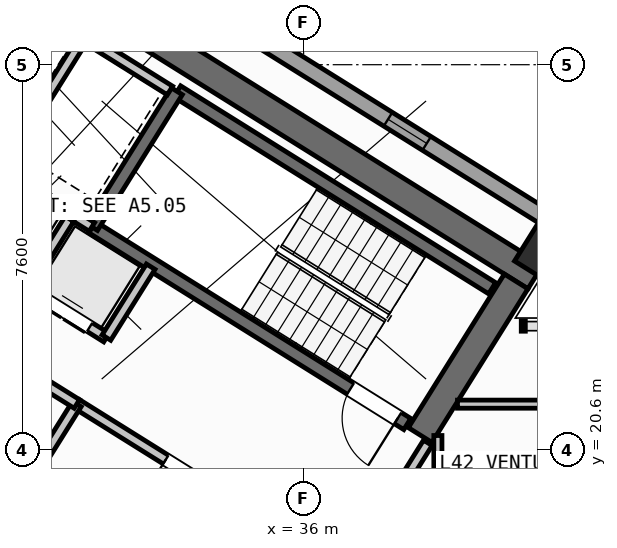
"""IFC4 building model, lengths in metres.
Left out: names, types, materials, properties, quantities, classifications, styles, units other than length and angle.
Written with IfcOpenShell. Run it as: python <this file> out.ifc"""

import sys

from ifc_helpers import new_model, si_unit, direction, frame, frame_2d, origin, origin_2d, place, context, subcontext, project, spatial, rectangle, hollow_rectangle, extrude, source, transform, mapped, element, fill, save


model = new_model("IFC4")
c1 = context("Model", 3, precision=1e-05, world=origin(), true_north=direction((0.0, 1.0)))
c2 = subcontext(c1, "Body", "Model", "MODEL_VIEW")
j1 = project(units=[si_unit("LENGTHUNIT", "METRE"), si_unit("PLANEANGLEUNIT", "RADIAN")], contexts=[c1])
p1 = place(None, origin())
s1 = spatial("IfcSite", under=j1, at=p1, CompositionType="ELEMENT")
p2 = place(p1, origin())
s2 = spatial("IfcBuilding", under=s1, at=p2, CompositionType="ELEMENT")
p3 = place(p2, frame((0.0, 0.0, 165.9)))
s3 = spatial("IfcBuildingStorey", under=s2, at=p3, CompositionType="ELEMENT", Elevation=165.9)
p4 = place(p3, frame((40.573, 24.01, 0.0), z_axis=(0.0, 0.0, 1.0), x_axis=(-0.848047359947, 0.529920442413, 0.0)))
e1 = element("IfcWall", 1, at=p4, inside=s3, PredefinedType="SHEAR", context=c2, shape_type="SweptSolid", body=[
    extrude(rectangle(XDim=13.14, YDim=0.55, at=frame_2d((6.57, 0.0))), origin(), (0.0, 0.0, 1.0), 3.32),
])
p5 = place(p3, frame((40.194, 23.922, 0.0), z_axis=(0.0, 0.0, 1.0), x_axis=(-0.529888438328, -0.848067357541, 0.0)))
e2 = element("IfcWall", 2, at=p5, inside=s3, PredefinedType="SHEAR", context=c2, shape_type="SweptSolid", body=[
    extrude(rectangle(XDim=3.575, YDim=0.55, at=frame_2d((1.788, 0.0))), origin(), (0.0, 0.0, 1.0), 3.32),
])
m1 = source(origin(), c2, "Body", "SweptSolid", [
    extrude(hollow_rectangle(XDim=0.9, YDim=0.9, WallThickness=0.036, at=origin_2d()), origin(), (0.0, 0.0, 1.0), 3.6),
])
p6 = place(p3, frame((40.783, 24.469, 0.0), z_axis=(0.0, 0.0, 1.0), x_axis=(-0.848048096156, 0.529919264233, 0.0)))
e3 = element("IfcColumn", 3, at=p6, inside=s3, PredefinedType="COLUMN", context=c2, shape_type="MappedRepresentation", body=[
    mapped(m1, transform((0.0, 0.0, 0.0), scale=1.0)),
])
p7 = place(p3, frame((14.138, 41.825, 0.0), z_axis=(0.0, 0.0, 1.0), x_axis=(0.848046498049, -0.529921821731, 0.0)))
e4 = element("IfcWall", 4, at=p7, inside=s3, PredefinedType="STANDARD", context=c2, shape_type="SweptSolid", body=[
    extrude(rectangle(XDim=31.588, YDim=0.32, at=frame_2d((15.794, 0.0))), origin(), (0.0, 0.0, 1.0), 3.32),
])
p8 = place(p7, frame((3.253, 0.0, 0.0)))
e5 = element("IfcOpeningElement", 5, at=p8, cuts=e4, PredefinedType="OPENING", context=c2, shape_type="SweptSolid", body=[
    extrude(rectangle(XDim=1.05, YDim=2.15, at=frame_2d((0.525, 1.075))), frame((0.0, 0.17, 0.0), z_axis=(0.0, -1.0, 0.0), x_axis=(1.0, 0.0, 0.0)), (0.0, 0.0, 1.0), 0.34),
])
p9 = place(p7, frame((0.863, 0.0, 0.85)))
e6 = element("IfcOpeningElement", 6, at=p9, cuts=e4, PredefinedType="OPENING", context=c2, shape_type="SweptSolid", body=[
    extrude(rectangle(XDim=1.8, YDim=1.5, at=frame_2d((0.9, 0.75))), frame((0.0, 0.17, 0.0), z_axis=(0.0, -1.0, 0.0), x_axis=(1.0, 0.0, 0.0)), (0.0, 0.0, 1.0), 0.34),
])
p10 = place(p7, frame((8.494, 0.0, 0.85)))
e7 = element("IfcOpeningElement", 7, at=p10, cuts=e4, PredefinedType="OPENING", context=c2, shape_type="SweptSolid", body=[
    extrude(rectangle(XDim=1.8, YDim=1.5, at=frame_2d((0.9, 0.75))), frame((0.0, 0.17, 0.0), z_axis=(0.0, -1.0, 0.0), x_axis=(1.0, 0.0, 0.0)), (0.0, 0.0, 1.0), 0.34),
])
p11 = place(p7, frame((13.874, 0.0, 0.85)))
e8 = element("IfcOpeningElement", 8, at=p11, cuts=e4, PredefinedType="OPENING", context=c2, shape_type="SweptSolid", body=[
    extrude(rectangle(XDim=1.5, YDim=1.5, at=frame_2d((0.75, 0.75))), frame((0.0, 0.17, 0.0), z_axis=(0.0, -1.0, 0.0), x_axis=(1.0, 0.0, 0.0)), (0.0, 0.0, 1.0), 0.34),
])
p12 = place(p7, frame((17.104, 0.0, 1.0)))
e9 = element("IfcOpeningElement", 9, at=p12, cuts=e4, PredefinedType="OPENING", context=c2, shape_type="SweptSolid", body=[
    extrude(rectangle(XDim=0.9, YDim=1.25, at=frame_2d((0.45, 0.625))), frame((0.0, 0.17, 0.0), z_axis=(0.0, -1.0, 0.0), x_axis=(1.0, 0.0, 0.0)), (0.0, 0.0, 1.0), 0.34),
])
p13 = place(p7, frame((22.144, 0.0, 1.0)))
e10 = element("IfcOpeningElement", 10, at=p13, cuts=e4, PredefinedType="OPENING", context=c2, shape_type="SweptSolid", body=[
    extrude(rectangle(XDim=0.9, YDim=1.25, at=frame_2d((0.45, 0.625))), frame((0.0, 0.17, 0.0), z_axis=(0.0, -1.0, 0.0), x_axis=(1.0, 0.0, 0.0)), (0.0, 0.0, 1.0), 0.34),
])
p14 = place(p7, frame((27.744, 0.0, 1.0)))
e11 = element("IfcOpeningElement", 11, at=p14, cuts=e4, PredefinedType="OPENING", context=c2, shape_type="SweptSolid", body=[
    extrude(rectangle(XDim=0.9, YDim=1.25, at=frame_2d((0.45, 0.625))), frame((0.0, 0.17, 0.0), z_axis=(0.0, -1.0, 0.0), x_axis=(1.0, 0.0, 0.0)), (0.0, 0.0, 1.0), 0.34),
])
p15 = place(p3, frame((31.28, 18.261, 0.0), z_axis=(0.0, 0.0, 1.0), x_axis=(-0.848051618787, 0.529913626805, 0.0)))
e12 = element("IfcWall", 12, at=p15, inside=s3, PredefinedType="SHEAR", context=c2, shape_type="SweptSolid", body=[
    extrude(rectangle(XDim=7.46, YDim=0.26, at=frame_2d((3.73, 0.0))), origin(), (0.0, 0.0, 1.0), 3.32),
])
p16 = place(p15, frame((0.36, 0.0, 0.0)))
e13 = element("IfcOpeningElement", 13, at=p16, cuts=e12, PredefinedType="OPENING", context=c2, shape_type="SweptSolid", body=[
    extrude(rectangle(XDim=0.86, YDim=2.05, at=frame_2d((0.43, 1.025))), frame((0.0, 0.14, 0.0), z_axis=(0.0, -1.0, 0.0), x_axis=(1.0, 0.0, 0.0)), (0.0, 0.0, 1.0), 0.28),
])
p17 = place(p3, frame((39.721, 23.788, 0.0), z_axis=(0.0, 0.0, 1.0), x_axis=(-0.848054434086, 0.529909121291, 0.0)))
e14 = element("IfcWall", 14, at=p17, inside=s3, PredefinedType="SHEAR", context=c2, shape_type="SweptSolid", body=[
    extrude(rectangle(XDim=7.33, YDim=0.26, at=frame_2d((3.665, 0.0))), origin(), (0.0, 0.0, 1.0), 3.32),
])
p18 = place(p3, frame((38.046, 21.108, 0.0), z_axis=(0.0, 0.0, 1.0), x_axis=(-0.848054434086, 0.529909121291, 0.0)))
e15 = element("IfcWall", 15, at=p18, inside=s3, PredefinedType="SHEAR", context=c2, shape_type="SweptSolid", body=[
    extrude(rectangle(XDim=7.33, YDim=0.26, at=frame_2d((3.665, 0.0))), origin(), (0.0, 0.0, 1.0), 3.32),
])
p19 = place(p18, frame((0.22, 0.0, 0.0)))
e16 = element("IfcOpeningElement", 16, at=p19, cuts=e15, PredefinedType="OPENING", context=c2, shape_type="SweptSolid", body=[
    extrude(rectangle(XDim=1.1, YDim=2.1, at=frame_2d((0.55, 1.05))), frame((0.0, 0.14, 0.0), z_axis=(0.0, -1.0, 0.0), x_axis=(1.0, 0.0, 0.0)), (0.0, 0.0, 1.0), 0.28),
])
p20 = place(p3, frame((33.496, 27.677, 0.0), z_axis=(0.0, 0.0, 1.0), x_axis=(-0.529908658664, -0.84805472316, 0.0)))
e17 = element("IfcWall", 17, at=p20, inside=s3, PredefinedType="SHEAR", context=c2, shape_type="SweptSolid", body=[
    extrude(rectangle(XDim=3.16, YDim=0.26, at=frame_2d((1.58, 0.0))), origin(), (0.0, 0.0, 1.0), 3.32),
])
p21 = place(p3, frame((36.417, 18.447, 0.0), z_axis=(0.0, 0.0, 1.0), x_axis=(-0.848064879198, 0.529892404805, 0.0)))
e18 = element("IfcWall", 18, at=p21, inside=s3, PredefinedType="STANDARD", context=c2, shape_type="SweptSolid", body=[
    extrude(rectangle(XDim=5.768, YDim=0.2, at=frame_2d((2.884, 0.0))), origin(), (0.0, 0.0, 1.0), 3.31),
])
p22 = place(p21, frame((2.548, 0.0, 0.0)))
e19 = element("IfcOpeningElement", 19, at=p22, cuts=e18, PredefinedType="OPENING", context=c2, shape_type="SweptSolid", body=[
    extrude(rectangle(XDim=1.15, YDim=2.1, at=frame_2d((0.575, 1.05))), frame((0.0, 0.11, 0.0), z_axis=(0.0, -1.0, 0.0), x_axis=(1.0, 0.0, 0.0)), (0.0, 0.0, 1.0), 0.22),
])
p23 = place(p3, frame((31.822, 24.998, 0.0), z_axis=(0.0, 0.0, 1.0), x_axis=(-0.848036912365, 0.52993716162, 0.0)))
e20 = element("IfcWall", 20, at=p23, inside=s3, PredefinedType="STANDARD", context=c2, shape_type="SweptSolid", body=[
    extrude(rectangle(XDim=4.618, YDim=0.2, at=frame_2d((2.309, 0.0))), origin(), (0.0, 0.0, 1.0), 3.31),
])
p24 = place(p3, frame((32.108, 22.814, 0.0), z_axis=(0.0, 0.0, 1.0), x_axis=(-0.848042229521, 0.529928652696, 0.0)))
e21 = element("IfcWall", 21, at=p24, inside=s3, PredefinedType="STANDARD", context=c2, shape_type="SweptSolid", body=[
    extrude(rectangle(XDim=5.62, YDim=0.2, at=frame_2d((2.81, 0.0))), origin(), (0.0, 0.0, 1.0), 3.31),
])
p25 = place(p24, frame((0.39, 0.0, 0.0)))
e22 = element("IfcOpeningElement", 22, at=p25, cuts=e21, PredefinedType="OPENING", context=c2, shape_type="SweptSolid", body=[
    extrude(rectangle(XDim=1.1, YDim=2.15, at=frame_2d((0.55, 1.075))), frame((0.0, 0.11, 0.0), z_axis=(0.0, -1.0, 0.0), x_axis=(1.0, 0.0, 0.0)), (0.0, 0.0, 1.0), 0.22),
])
p26 = place(p24, frame((2.25, 0.0, 0.0)))
e23 = element("IfcOpeningElement", 23, at=p26, cuts=e21, PredefinedType="OPENING", context=c2, shape_type="SweptSolid", body=[
    extrude(rectangle(XDim=1.1, YDim=2.15, at=frame_2d((0.55, 1.075))), frame((0.0, 0.11, 0.0), z_axis=(0.0, -1.0, 0.0), x_axis=(1.0, 0.0, 0.0)), (0.0, 0.0, 1.0), 0.22),
])
p27 = place(p24, frame((4.11, 0.0, 0.0)))
e24 = element("IfcOpeningElement", 24, at=p27, cuts=e21, PredefinedType="OPENING", context=c2, shape_type="SweptSolid", body=[
    extrude(rectangle(XDim=1.1, YDim=2.15, at=frame_2d((0.55, 1.075))), frame((0.0, 0.11, 0.0), z_axis=(0.0, -1.0, 0.0), x_axis=(1.0, 0.0, 0.0)), (0.0, 0.0, 1.0), 0.22),
])
p28 = place(p3, frame((32.982, 24.213, 0.0), z_axis=(0.0, 0.0, 1.0), x_axis=(-0.529839334948, -0.84809803628, 0.0)))
e25 = element("IfcWall", 25, at=p28, inside=s3, PredefinedType="STANDARD", context=c2, shape_type="SweptSolid", body=[
    extrude(rectangle(XDim=1.65, YDim=0.2, at=frame_2d((0.825, 0.0))), origin(), (0.0, 0.0, 1.0), 3.31),
])
p29 = place(p3, frame((31.645, 28.716, 0.0), z_axis=(0.0, 0.0, 1.0), x_axis=(-0.52986693015, -0.848080795876, 0.0)))
e26 = element("IfcWall", 26, at=p29, inside=s3, PredefinedType="STANDARD", context=c2, shape_type="SweptSolid", body=[
    extrude(rectangle(XDim=2.66, YDim=0.2, at=frame_2d((1.33, 0.0))), origin(), (0.0, 0.0, 1.0), 3.31),
])
p30 = place(p3, frame((33.363, 27.69, 0.0), z_axis=(0.0, 0.0, 1.0), x_axis=(-0.848047090064, 0.529920874315, 0.0)))
e27 = element("IfcWall", 27, at=p30, inside=s3, PredefinedType="STANDARD", context=c2, shape_type="SweptSolid", body=[
    extrude(rectangle(XDim=4.498, YDim=0.2, at=frame_2d((2.249, 0.0))), origin(), (0.0, 0.0, 1.0), 3.31),
])
p31 = place(p3, frame((31.379, 25.156, 0.0), z_axis=(0.0, 0.0, 1.0), x_axis=(-0.529998940003, -0.847998304005, 0.0)))
e28 = element("IfcWall", 28, at=p31, inside=s3, PredefinedType="STANDARD", context=c2, shape_type="SweptSolid", body=[
    extrude(rectangle(XDim=1.58, YDim=0.2, at=frame_2d((0.79, 0.0))), origin(), (0.0, 0.0, 1.0), 3.31),
])
p32 = place(p3, frame((31.525, 21.504, 0.0), z_axis=(0.0, 0.0, 1.0), x_axis=(-0.529907497854, -0.848055448493, 0.0)))
e29 = element("IfcWall", 29, at=p32, inside=s3, PredefinedType="STANDARD", context=c2, shape_type="SweptSolid", body=[
    extrude(rectangle(XDim=2.88, YDim=0.2, at=frame_2d((1.44, 0.0))), origin(), (0.0, 0.0, 1.0), 3.31),
])
p33 = place(p3, frame((31.525, 21.504, 0.0), z_axis=(0.0, 0.0, 1.0), x_axis=(-0.848040211232, 0.529931882541, 0.0)))
e30 = element("IfcWall", 30, at=p33, inside=s3, PredefinedType="STANDARD", context=c2, shape_type="SweptSolid", body=[
    extrude(rectangle(XDim=6.218, YDim=0.2, at=frame_2d((3.109, 0.0))), origin(), (0.0, 0.0, 1.0), 3.31),
])
p34 = place(p33, frame((4.4, 0.0, 0.0)))
e31 = element("IfcOpeningElement", 31, at=p34, cuts=e30, PredefinedType="OPENING", context=c2, shape_type="SweptSolid", body=[
    extrude(rectangle(XDim=0.86, YDim=2.05, at=frame_2d((0.43, 1.025))), frame((0.0, 0.11, 0.0), z_axis=(0.0, -1.0, 0.0), x_axis=(1.0, 0.0, 0.0)), (0.0, 0.0, 1.0), 0.22),
])
p35 = place(p33, frame((1.45, 0.0, 0.0)))
e32 = element("IfcOpeningElement", 32, at=p35, cuts=e30, PredefinedType="OPENING", context=c2, shape_type="SweptSolid", body=[
    extrude(rectangle(XDim=0.86, YDim=2.05, at=frame_2d((0.43, 1.025))), frame((0.0, 0.11, 0.0), z_axis=(0.0, -1.0, 0.0), x_axis=(1.0, 0.0, 0.0)), (0.0, 0.0, 1.0), 0.22),
])
p36 = place(p3, frame((38.451, 20.737, 0.0), z_axis=(0.0, 0.0, 1.0), x_axis=(-0.529924799939, -0.848044637038, 0.0)))
e33 = element("IfcWall", 33, at=p36, inside=s3, PredefinedType="STANDARD", context=c2, shape_type="SweptSolid", body=[
    extrude(rectangle(XDim=2.96, YDim=0.2, at=frame_2d((1.48, 0.0))), origin(), (0.0, 0.0, 1.0), 3.31),
])
p37 = place(p36, frame((1.46, 0.0, 0.0)))
e34 = element("IfcOpeningElement", 34, at=p37, cuts=e33, PredefinedType="OPENING", context=c2, shape_type="SweptSolid", body=[
    extrude(rectangle(XDim=0.86, YDim=2.05, at=frame_2d((0.43, 1.025))), frame((0.0, 0.11, 0.0), z_axis=(0.0, -1.0, 0.0), x_axis=(1.0, 0.0, 0.0)), (0.0, 0.0, 1.0), 0.22),
])
p38 = place(p3, frame((38.65, 17.93, 0.0), z_axis=(0.0, 0.0, 1.0), x_axis=(0.0, 1.0, 0.0)))
e35 = element("IfcWall", 35, at=p38, inside=s3, PredefinedType="PARTITIONING", context=c2, shape_type="SweptSolid", body=[
    extrude(rectangle(XDim=2.951, YDim=0.16, at=frame_2d((1.476, 0.0))), origin(), (0.0, 0.0, 1.0), 3.31),
])
p39 = place(p3, frame((39.037, 21.5, 0.0), z_axis=(0.0, 0.0, 1.0), x_axis=(1.0, 0.0, 0.0)))
e36 = element("IfcWall", 36, at=p39, inside=s3, PredefinedType="PARTITIONING", context=c2, shape_type="SweptSolid", body=[
    extrude(rectangle(XDim=7.215, YDim=0.16, at=frame_2d((3.607, 0.0))), origin(), (0.0, 0.0, 1.0), 3.31),
])
m2 = source(origin(), c2, "Body", "SweptSolid", [
    extrude(rectangle(XDim=0.9, YDim=1.25, at=frame_2d((0.45, 0.625))), frame((0.0, 0.03, 0.0), z_axis=(0.0, -1.0, 0.0), x_axis=(1.0, 0.0, 0.0)), (0.0, 0.0, 1.0), 0.06),
])
p40 = place(p14, origin())
e37 = element("IfcWindow", 37, at=p40, inside=s3, PartitioningType="SINGLE_PANEL", PredefinedType="WINDOW", context=c2, shape_type="MappedRepresentation", body=[
    mapped(m2, transform((0.0, 0.0, 0.0), scale=1.0)),
])
fill(e11, e37)
m3 = source(origin(), c2, "Body", "SweptSolid", [
    extrude(rectangle(XDim=1.1, YDim=2.1, at=frame_2d((0.55, 1.05))), frame((0.0, 0.025, 0.0), z_axis=(0.0, -1.0, 0.0), x_axis=(1.0, 0.0, 0.0)), (0.0, 0.0, 1.0), 0.05),
])
p41 = place(p19, origin())
e38 = element("IfcDoor", 38, at=p41, inside=s3, OperationType="SINGLE_SWING_LEFT", PredefinedType="DOOR", context=c2, shape_type="MappedRepresentation", body=[
    mapped(m3, transform((0.0, 0.0, 0.0), scale=1.0)),
])
fill(e16, e38)
m4 = source(origin(), c2, "Body", "SweptSolid", [
    extrude(rectangle(XDim=1.15, YDim=2.1, at=frame_2d((0.575, 1.05))), frame((0.0, 0.025, 0.0), z_axis=(0.0, -1.0, 0.0), x_axis=(1.0, 0.0, 0.0)), (0.0, 0.0, 1.0), 0.05),
])
p42 = place(p22, origin())
e39 = element("IfcDoor", 39, at=p42, inside=s3, OperationType="SINGLE_SWING_RIGHT", PredefinedType="DOOR", context=c2, shape_type="MappedRepresentation", body=[
    mapped(m4, transform((0.0, 0.0, 0.0), scale=1.0)),
])
fill(e19, e39)
m5 = source(origin(), c2, "Body", "SweptSolid", [
    extrude(rectangle(XDim=1.1, YDim=2.15, at=frame_2d((0.55, 1.075))), frame((0.0, 0.025, 0.0), z_axis=(0.0, -1.0, 0.0), x_axis=(1.0, 0.0, 0.0)), (0.0, 0.0, 1.0), 0.05),
])
p43 = place(p25, origin())
e40 = element("IfcDoor", 40, at=p43, inside=s3, OperationType="DOUBLE_DOOR_SLIDING", PredefinedType="DOOR", context=c2, shape_type="MappedRepresentation", body=[
    mapped(m5, transform((0.0, 0.0, 0.0), scale=1.0)),
])
fill(e22, e40)
save(model, sys.argv[1])
